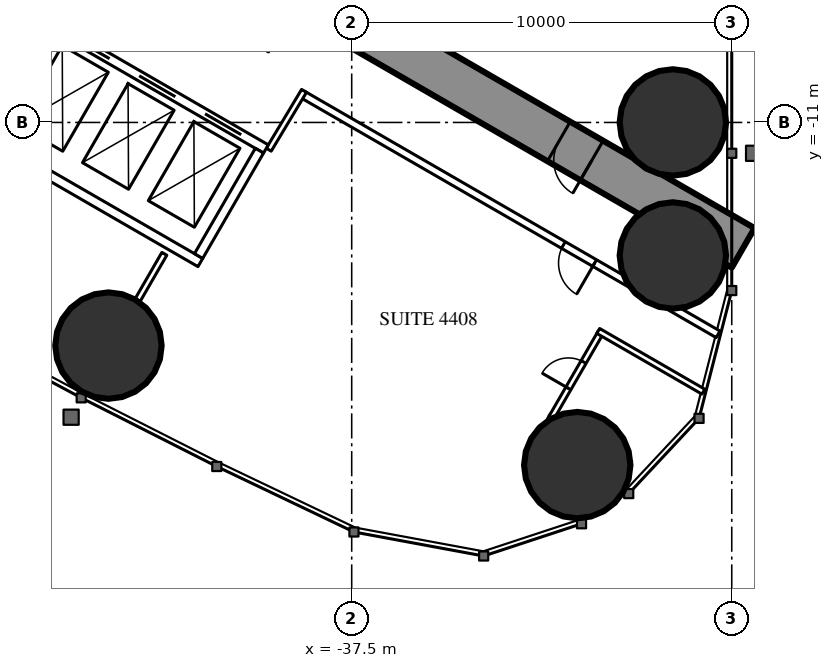
"""IFC4 building model, lengths in metres.
Left out: names, types, materials, properties, quantities, classifications, styles, units other than length and angle.
Written with IfcOpenShell. Run it as: python <this file> out.ifc"""

import sys

from ifc_helpers import new_model, si_unit, direction, frame, frame_2d, origin, origin_2d, place, context, subcontext, project, spatial, rectangle, circle, extrude, element, fill, save


model = new_model("IFC4")
c1 = context("Model", 3, precision=1e-05, world=origin(), true_north=direction((0.0, 1.0)))
c2 = subcontext(c1, "Body", "Model", "MODEL_VIEW")
j1 = project(units=[si_unit("LENGTHUNIT", "METRE"), si_unit("PLANEANGLEUNIT", "RADIAN")], contexts=[c1])
p1 = place(None, origin())
s1 = spatial("IfcSite", under=j1, at=p1, CompositionType="ELEMENT")
p2 = place(p1, origin())
s2 = spatial("IfcBuilding", under=s1, at=p2, CompositionType="ELEMENT")
p3 = place(p2, frame((0.0, 0.0, 166.8)))
s3 = spatial("IfcBuildingStorey", under=s2, at=p3, CompositionType="ELEMENT", Elevation=166.8)
for number, where, z_axis, x_axis in (
    (1, (-31.565, -20.016, 0.0), (0.0, 0.0, 1.0), (1.0, 0.0, 0.0)),
    (2, (-29.05, -11.0, 0.0), (0.0, 0.0, 1.0), (1.0, 0.0, 0.0)),
    (3, (-29.05, -14.5, 0.0), (0.0, 0.0, 1.0), (1.0, 0.0, 0.0)),
    (4, (-43.9, -16.871, 0.0), (0.0, 0.0, 1.0), (1.0, 0.0, 0.0)),
):
    element("IfcColumn", number, at=place(p3, frame(where, z_axis=z_axis, x_axis=x_axis)), inside=s3, PredefinedType="COLUMN", context=c2, shape_type="SweptSolid", body=[
        extrude(circle(Radius=1.4, at=origin_2d()), origin(), (0.0, 0.0, 1.0), 3.5),
    ])
p4 = place(p3, frame((-27.2, -14.3, 0.0), z_axis=(0.0, 0.0, 1.0), x_axis=(-0.866024021859, 0.500002393557, 0.0)))
e5 = element("IfcWall", 5, at=p4, inside=s3, PredefinedType="SHEAR", context=c2, shape_type="SweptSolid", body=[
    extrude(rectangle(XDim=27.907, YDim=1.2, at=frame_2d((13.954, 0.0))), origin(), (0.0, 0.0, 1.0), 3.5),
])
p5 = place(p4, frame((4.6, 0.0, 0.0)))
e6 = element("IfcOpeningElement", 6, at=p5, cuts=e5, PredefinedType="OPENING", context=c2, shape_type="SweptSolid", body=[
    extrude(rectangle(XDim=1.0, YDim=2.2, at=frame_2d((0.5, 1.1))), frame((0.0, 0.61, 0.0), z_axis=(0.0, -1.0, 0.0), x_axis=(1.0, 0.0, 0.0)), (0.0, 0.0, 1.0), 1.22),
])
p6 = place(p4, frame((13.395, 0.0, 0.0)))
e7 = element("IfcOpeningElement", 7, at=p6, cuts=e5, PredefinedType="OPENING", context=c2, shape_type="SweptSolid", body=[
    extrude(rectangle(XDim=1.8, YDim=2.2, at=frame_2d((0.9, 1.1))), frame((0.0, 0.61, 0.0), z_axis=(0.0, -1.0, 0.0), x_axis=(1.0, 0.0, 0.0)), (0.0, 0.0, 1.0), 1.22),
])
p7 = place(p3, frame((-42.429, -14.457, 0.0), z_axis=(0.0, 0.0, 1.0), x_axis=(-0.5000578829, -0.865991982497, 0.0)))
e8 = element("IfcWall", 8, at=p7, inside=s3, PredefinedType="PARTITIONING", context=c2, shape_type="SweptSolid", body=[
    extrude(rectangle(XDim=1.407, YDim=0.15, at=frame_2d((0.704, 0.0))), origin(), (0.0, 0.0, 1.0), 3.25),
])
p8 = place(p3, frame((-27.86, -16.575, 0.0), z_axis=(0.0, 0.0, 1.0), x_axis=(-0.866027756871, 0.499995924312, 0.0)))
e9 = element("IfcWall", 9, at=p8, inside=s3, PredefinedType="PARTITIONING", context=c2, shape_type="SweptSolid", body=[
    extrude(rectangle(XDim=12.622, YDim=0.2, at=frame_2d((6.311, 0.0))), origin(), (0.0, 0.0, 1.0), 3.25),
])
p9 = place(p8, frame((3.75, 0.0, 0.0)))
e10 = element("IfcOpeningElement", 10, at=p9, cuts=e9, PredefinedType="OPENING", context=c2, shape_type="SweptSolid", body=[
    extrude(rectangle(XDim=0.95, YDim=2.2, at=frame_2d((0.475, 1.1))), frame((0.0, 0.11, 0.0), z_axis=(0.0, -1.0, 0.0), x_axis=(1.0, 0.0, 0.0)), (0.0, 0.0, 1.0), 0.22),
])
p10 = place(p3, frame((-39.683, -11.718, 0.0), z_axis=(0.0, 0.0, 1.0), x_axis=(0.514336634837, 0.857588377991, 0.0)))
e11 = element("IfcWall", 11, at=p10, inside=s3, PredefinedType="PARTITIONING", context=c2, shape_type="SweptSolid", body=[
    extrude(rectangle(XDim=1.805, YDim=0.15, at=frame_2d((0.903, 0.0))), origin(), (0.0, 0.0, 1.0), 3.25),
])
p11 = place(p3, frame((-30.17, -19.975, 0.0), z_axis=(0.0, 0.0, 1.0), x_axis=(-0.866006523861, 0.500032699561, 0.0)))
e12 = element("IfcWall", 12, at=p11, inside=s3, PredefinedType="PARTITIONING", context=c2, shape_type="SweptSolid", body=[
    extrude(rectangle(XDim=2.475, YDim=0.15, at=frame_2d((1.237, 0.0))), origin(), (0.0, 0.0, 1.0), 3.25),
])
p12 = place(p3, frame((-30.948, -16.524, 0.0), z_axis=(0.0, 0.0, 1.0), x_axis=(-0.500006934395, -0.866021400173, 0.0)))
e13 = element("IfcWall", 13, at=p12, inside=s3, PredefinedType="PARTITIONING", context=c2, shape_type="SweptSolid", body=[
    extrude(rectangle(XDim=2.6, YDim=0.15, at=frame_2d((1.3, 0.0))), origin(), (0.0, 0.0, 1.0), 2.3),
])
p13 = place(p12, frame((0.9, 0.0, 0.0)))
e14 = element("IfcOpeningElement", 14, at=p13, cuts=e13, PredefinedType="OPENING", context=c2, shape_type="SweptSolid", body=[
    extrude(rectangle(XDim=0.8, YDim=2.2, at=frame_2d((0.4, 1.1))), frame((0.0, 0.085, 0.0), z_axis=(0.0, -1.0, 0.0), x_axis=(1.0, 0.0, 0.0)), (0.0, 0.0, 1.0), 0.17),
])
p14 = place(p3, frame((-28.246, -18.084, 0.0), z_axis=(0.0, 0.0, 1.0), x_axis=(-0.866029063467, 0.49999366119, 0.0)))
e15 = element("IfcWall", 15, at=p14, inside=s3, PredefinedType="PARTITIONING", context=c2, shape_type="SweptSolid", body=[
    extrude(rectangle(XDim=3.195, YDim=0.15, at=frame_2d((1.597, 0.0))), origin(), (0.0, 0.0, 1.0), 3.25),
])
p15 = place(p3, frame((-39.758, -11.697, 0.0), z_axis=(0.0, 0.0, 1.0), x_axis=(-0.866024194504, 0.500002094529, 0.0)))
e16 = element("IfcWall", 16, at=p15, inside=s3, PredefinedType="PARTITIONING", context=c2, shape_type="SweptSolid", body=[
    extrude(rectangle(XDim=6.6, YDim=0.25, at=frame_2d((3.3, 0.0))), origin(), (0.0, 0.0, 1.0), 3.25),
])
p16 = place(p15, frame((0.75, 0.0, 0.0)))
e17 = element("IfcOpeningElement", 17, at=p16, cuts=e16, PredefinedType="OPENING", context=c2, shape_type="SweptSolid", body=[
    extrude(rectangle(XDim=1.1, YDim=2.2, at=frame_2d((0.55, 1.1))), frame((0.0, 0.135, 0.0), z_axis=(0.0, -1.0, 0.0), x_axis=(1.0, 0.0, 0.0)), (0.0, 0.0, 1.0), 0.27),
])
p17 = place(p15, frame((2.75, 0.0, 0.0)))
e18 = element("IfcOpeningElement", 18, at=p17, cuts=e16, PredefinedType="OPENING", context=c2, shape_type="SweptSolid", body=[
    extrude(rectangle(XDim=1.1, YDim=2.2, at=frame_2d((0.55, 1.1))), frame((0.0, 0.135, 0.0), z_axis=(0.0, -1.0, 0.0), x_axis=(1.0, 0.0, 0.0)), (0.0, 0.0, 1.0), 0.27),
])
p18 = place(p15, frame((4.75, 0.0, 0.0)))
e19 = element("IfcOpeningElement", 19, at=p18, cuts=e16, PredefinedType="OPENING", context=c2, shape_type="SweptSolid", body=[
    extrude(rectangle(XDim=1.1, YDim=2.2, at=frame_2d((0.55, 1.1))), frame((0.0, 0.135, 0.0), z_axis=(0.0, -1.0, 0.0), x_axis=(1.0, 0.0, 0.0)), (0.0, 0.0, 1.0), 0.27),
])
p19 = place(p3, frame((-41.482, -14.686, 0.0), z_axis=(0.0, 0.0, 1.0), x_axis=(-0.86603344179, 0.499986077507, 0.0)))
e20 = element("IfcWall", 20, at=p19, inside=s3, PredefinedType="PARTITIONING", context=c2, shape_type="SweptSolid", body=[
    extrude(rectangle(XDim=6.6, YDim=0.25, at=frame_2d((3.3, 0.0))), origin(), (0.0, 0.0, 1.0), 3.25),
])
for number, where, z_axis, x_axis in (
    (21, (-39.928, -11.743, 0.0), (0.0, 0.0, 1.0), (-0.5, -0.866, 0.0)),
    (22, (-45.428, -8.568, 0.0), (0.0, 0.0, 1.0), (-0.5, -0.866, 0.0)),
):
    element("IfcWall", number, at=place(p3, frame(where, z_axis=z_axis, x_axis=x_axis)), inside=s3, PredefinedType="PARTITIONING", context=c2, shape_type="SweptSolid", body=[
        extrude(rectangle(XDim=3.201, YDim=0.25, at=frame_2d((1.6, 0.0))), origin(), (0.0, 0.0, 1.0), 3.25),
    ])
p20 = place(p13, origin())
e23 = element("IfcDoor", 23, at=p20, inside=s3, OperationType="SINGLE_SWING_RIGHT", PredefinedType="DOOR", context=c2, shape_type="SweptSolid", body=[
    extrude(rectangle(XDim=0.8, YDim=2.2, at=frame_2d((0.4, 1.1))), frame((0.0, 0.025, 0.0), z_axis=(0.0, -1.0, 0.0), x_axis=(1.0, 0.0, 0.0)), (0.0, 0.0, 1.0), 0.05),
])
fill(e14, e23)
p21 = place(p9, origin())
e24 = element("IfcDoor", 24, at=p21, inside=s3, OperationType="SINGLE_SWING_LEFT", PredefinedType="DOOR", context=c2, shape_type="SweptSolid", body=[
    extrude(rectangle(XDim=0.95, YDim=2.2, at=frame_2d((0.475, 1.1))), frame((0.0, 0.025, 0.0), z_axis=(0.0, -1.0, 0.0), x_axis=(1.0, 0.0, 0.0)), (0.0, 0.0, 1.0), 0.05),
])
fill(e10, e24)
p22 = place(p5, origin())
e25 = element("IfcDoor", 25, at=p22, inside=s3, OperationType="SINGLE_SWING_LEFT", PredefinedType="DOOR", context=c2, shape_type="SweptSolid", body=[
    extrude(rectangle(XDim=1.0, YDim=2.2, at=frame_2d((0.5, 1.1))), frame((0.0, 0.025, 0.0), z_axis=(0.0, -1.0, 0.0), x_axis=(1.0, 0.0, 0.0)), (0.0, 0.0, 1.0), 0.05),
])
fill(e6, e25)
p23 = place(p16, origin())
e26 = element("IfcDoor", 26, at=p23, inside=s3, OperationType="DOUBLE_DOOR_SLIDING", PredefinedType="USERDEFINED", context=c2, shape_type="SweptSolid", body=[
    extrude(rectangle(XDim=1.1, YDim=2.2, at=frame_2d((0.55, 1.1))), frame((0.0, 0.025, 0.0), z_axis=(0.0, -1.0, 0.0), x_axis=(1.0, 0.0, 0.0)), (0.0, 0.0, 1.0), 0.05),
])
fill(e17, e26)
p24 = place(p17, origin())
e27 = element("IfcDoor", 27, at=p24, inside=s3, OperationType="DOUBLE_DOOR_SLIDING", PredefinedType="USERDEFINED", context=c2, shape_type="SweptSolid", body=[
    extrude(rectangle(XDim=1.1, YDim=2.2, at=frame_2d((0.55, 1.1))), frame((0.0, 0.025, 0.0), z_axis=(0.0, -1.0, 0.0), x_axis=(1.0, 0.0, 0.0)), (0.0, 0.0, 1.0), 0.05),
])
fill(e18, e27)
p25 = place(p18, origin())
e28 = element("IfcDoor", 28, at=p25, inside=s3, OperationType="DOUBLE_DOOR_SLIDING", PredefinedType="USERDEFINED", context=c2, shape_type="SweptSolid", body=[
    extrude(rectangle(XDim=1.1, YDim=2.2, at=frame_2d((0.55, 1.1))), frame((0.0, 0.025, 0.0), z_axis=(0.0, -1.0, 0.0), x_axis=(1.0, 0.0, 0.0)), (0.0, 0.0, 1.0), 0.05),
])
fill(e19, e28)
save(model, sys.argv[1])
